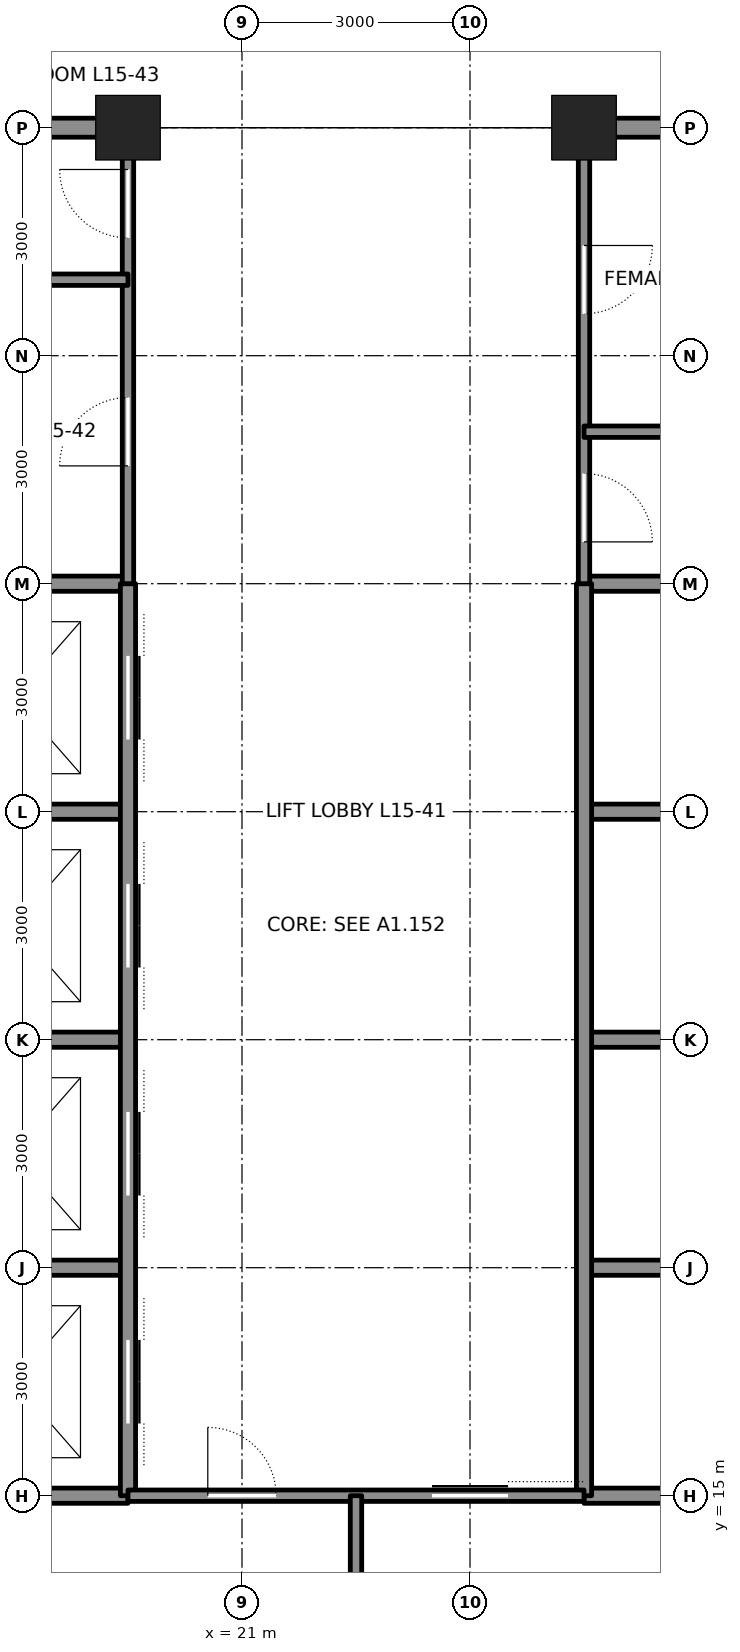
"""IFC4 building model, lengths in metres.
Left out: names, types, materials, properties, quantities, classifications, styles, units other than length and angle.
Written with IfcOpenShell. Run it as: python <this file> out.ifc"""

import sys

from ifc_helpers import new_model, si_unit, direction, frame, frame_2d, origin, origin_2d, place, context, subcontext, project, spatial, rectangle, hollow_rectangle, extrude, element, fill, save


model = new_model("IFC4")
c1 = context("Model", 3, precision=1e-05, world=origin(), true_north=direction((0.0, 1.0)))
c2 = subcontext(c1, "Body", "Model", "MODEL_VIEW")
j1 = project(units=[si_unit("LENGTHUNIT", "METRE"), si_unit("PLANEANGLEUNIT", "RADIAN")], contexts=[c1])
p1 = place(None, origin())
s1 = spatial("IfcSite", under=j1, at=p1, CompositionType="ELEMENT")
p2 = place(p1, origin())
s2 = spatial("IfcBuilding", under=s1, at=p2, CompositionType="ELEMENT")
p3 = place(p2, frame((0.0, 0.0, 73.8)))
s3 = spatial("IfcBuildingStorey", under=s2, at=p3, CompositionType="ELEMENT", Elevation=73.8)
for number, where, z_axis, x_axis in (
    (1, (19.5, 33.0, 0.0), (0.0, 0.0, 1.0), (1.0, 0.0, 0.0)),
    (2, (25.5, 33.0, 0.0), (0.0, 0.0, 1.0), (1.0, 0.0, 0.0)),
):
    element("IfcColumn", number, at=place(p3, frame(where, z_axis=z_axis, x_axis=x_axis)), inside=s3, PredefinedType="COLUMN", context=c2, shape_type="SweptSolid", body=[
        extrude(hollow_rectangle(XDim=0.85, YDim=0.85, WallThickness=0.085, at=origin_2d()), origin(), (0.0, 0.0, 1.0), 4.5),
    ])
for number, where, z_axis, x_axis in (
    (3, (12.0, 15.0, 0.0), (0.0, 0.0, 1.0), (1.0, 0.0, 0.0)),
    (4, (25.5, 15.0, 0.0), (0.0, 0.0, 1.0), (1.0, 0.0, 0.0)),
):
    element("IfcWall", number, at=place(p3, frame(where, z_axis=z_axis, x_axis=x_axis)), inside=s3, PredefinedType="SOLIDWALL", context=c2, shape_type="SweptSolid", body=[
        extrude(rectangle(XDim=7.5, YDim=0.2, at=frame_2d((3.75, 0.0))), origin(), (0.0, 0.0, 1.0), 4.34),
    ])
for number, where, z_axis, x_axis in (
    (5, (16.75, 24.0, 0.0), (0.0, 0.0, 1.0), (1.0, 0.0, 0.0)),
    (6, (25.5, 24.0, 0.0), (0.0, 0.0, 1.0), (1.0, 0.0, 0.0)),
):
    element("IfcWall", number, at=place(p3, frame(where, z_axis=z_axis, x_axis=x_axis)), inside=s3, PredefinedType="SOLIDWALL", context=c2, shape_type="SweptSolid", body=[
        extrude(rectangle(XDim=2.75, YDim=0.2, at=frame_2d((1.375, 0.0))), origin(), (0.0, 0.0, 1.0), 3.39),
    ])
p4 = place(p3, frame((12.0, 27.0, 0.0), z_axis=(0.0, 0.0, 1.0), x_axis=(1.0, 0.0, 0.0)))
e7 = element("IfcWall", 7, at=p4, inside=s3, PredefinedType="SOLIDWALL", context=c2, shape_type="SweptSolid", body=[
    extrude(rectangle(XDim=7.5, YDim=0.2, at=frame_2d((3.75, 0.0))), origin(), (0.0, 0.0, 1.0), 4.34),
])
p5 = place(p4, frame((1.65, 0.0, 0.0)))
e8 = element("IfcOpeningElement", 8, at=p5, cuts=e7, PredefinedType="OPENING", context=c2, shape_type="SweptSolid", body=[
    extrude(rectangle(XDim=1.2, YDim=2.1, at=frame_2d((0.6, 1.05))), frame((0.0, 0.11, 0.0), z_axis=(0.0, -1.0, 0.0), x_axis=(1.0, 0.0, 0.0)), (0.0, 0.0, 1.0), 0.22),
])
p6 = place(p3, frame((25.5, 27.0, 0.0), z_axis=(0.0, 0.0, 1.0), x_axis=(1.0, 0.0, 0.0)))
e9 = element("IfcWall", 9, at=p6, inside=s3, PredefinedType="SOLIDWALL", context=c2, shape_type="SweptSolid", body=[
    extrude(rectangle(XDim=3.0, YDim=0.2, at=frame_2d((1.5, 0.0))), origin(), (0.0, 0.0, 1.0), 4.34),
])
for number, where, z_axis, x_axis in (
    (10, (16.75, 33.0, 0.0), (0.0, 0.0, 1.0), (1.0, 0.0, 0.0)),
    (11, (25.75, 33.0, 0.0), (0.0, 0.0, 1.0), (1.0, 0.0, 0.0)),
):
    element("IfcWall", number, at=place(p3, frame(where, z_axis=z_axis, x_axis=x_axis)), inside=s3, PredefinedType="SOLIDWALL", context=c2, shape_type="SweptSolid", body=[
        extrude(rectangle(XDim=2.5, YDim=0.25, at=frame_2d((1.25, 0.0))), origin(), (0.0, 0.0, 1.0), 3.181),
    ])
p7 = place(p3, frame((16.5, 18.0, 0.0), z_axis=(0.0, 0.0, 1.0), x_axis=(1.0, 0.0, 0.0)))
e12 = element("IfcWall", 12, at=p7, inside=s3, PredefinedType="SOLIDWALL", context=c2, shape_type="SweptSolid", body=[
    extrude(rectangle(XDim=3.0, YDim=0.2, at=frame_2d((1.5, 0.0))), origin(), (0.0, 0.0, 1.0), 4.34),
])
p8 = place(p3, frame((25.5, 18.0, 0.0), z_axis=(0.0, 0.0, 1.0), x_axis=(1.0, 0.0, 0.0)))
e13 = element("IfcWall", 13, at=p8, inside=s3, PredefinedType="SOLIDWALL", context=c2, shape_type="SweptSolid", body=[
    extrude(rectangle(XDim=7.5, YDim=0.2, at=frame_2d((3.75, 0.0))), origin(), (0.0, 0.0, 1.0), 4.34),
])
p9 = place(p8, frame((4.65, 0.0, 0.0)))
e14 = element("IfcOpeningElement", 14, at=p9, cuts=e13, PredefinedType="OPENING", context=c2, shape_type="SweptSolid", body=[
    extrude(rectangle(XDim=1.2, YDim=2.1, at=frame_2d((0.6, 1.05))), frame((0.0, 0.11, 0.0), z_axis=(0.0, -1.0, 0.0), x_axis=(1.0, 0.0, 0.0)), (0.0, 0.0, 1.0), 0.22),
])
for number, where, z_axis, x_axis in (
    (15, (16.75, 21.0, 0.0), (0.0, 0.0, 1.0), (1.0, 0.0, 0.0)),
    (16, (25.5, 21.0, 0.0), (0.0, 0.0, 1.0), (1.0, 0.0, 0.0)),
):
    element("IfcWall", number, at=place(p3, frame(where, z_axis=z_axis, x_axis=x_axis)), inside=s3, PredefinedType="SOLIDWALL", context=c2, shape_type="SweptSolid", body=[
        extrude(rectangle(XDim=2.75, YDim=0.2, at=frame_2d((1.375, 0.0))), origin(), (0.0, 0.0, 1.0), 3.39),
    ])
p10 = place(p3, frame((19.5, 15.0, 0.0), z_axis=(0.0, 0.0, 1.0), x_axis=(0.0, 1.0, 0.0)))
e17 = element("IfcWall", 17, at=p10, inside=s3, PredefinedType="SOLIDWALL", context=c2, shape_type="SweptSolid", body=[
    extrude(rectangle(XDim=12.0, YDim=0.2, at=frame_2d((6.0, 0.0))), origin(), (0.0, 0.0, 1.0), 3.365),
])
p11 = place(p10, frame((0.95, 0.0, 0.0)))
e18 = element("IfcOpeningElement", 18, at=p11, cuts=e17, PredefinedType="OPENING", context=c2, shape_type="SweptSolid", body=[
    extrude(rectangle(XDim=1.1, YDim=2.1, at=frame_2d((0.55, 1.05))), frame((0.0, 0.11, 0.0), z_axis=(0.0, -1.0, 0.0), x_axis=(1.0, 0.0, 0.0)), (0.0, 0.0, 1.0), 0.22),
])
p12 = place(p10, frame((3.95, 0.0, 0.0)))
e19 = element("IfcOpeningElement", 19, at=p12, cuts=e17, PredefinedType="OPENING", context=c2, shape_type="SweptSolid", body=[
    extrude(rectangle(XDim=1.1, YDim=2.1, at=frame_2d((0.55, 1.05))), frame((0.0, 0.11, 0.0), z_axis=(0.0, -1.0, 0.0), x_axis=(1.0, 0.0, 0.0)), (0.0, 0.0, 1.0), 0.22),
])
p13 = place(p10, frame((6.95, 0.0, 0.0)))
e20 = element("IfcOpeningElement", 20, at=p13, cuts=e17, PredefinedType="OPENING", context=c2, shape_type="SweptSolid", body=[
    extrude(rectangle(XDim=1.1, YDim=2.1, at=frame_2d((0.55, 1.05))), frame((0.0, 0.11, 0.0), z_axis=(0.0, -1.0, 0.0), x_axis=(1.0, 0.0, 0.0)), (0.0, 0.0, 1.0), 0.22),
])
p14 = place(p10, frame((9.95, 0.0, 0.0)))
e21 = element("IfcOpeningElement", 21, at=p14, cuts=e17, PredefinedType="OPENING", context=c2, shape_type="SweptSolid", body=[
    extrude(rectangle(XDim=1.1, YDim=2.1, at=frame_2d((0.55, 1.05))), frame((0.0, 0.11, 0.0), z_axis=(0.0, -1.0, 0.0), x_axis=(1.0, 0.0, 0.0)), (0.0, 0.0, 1.0), 0.22),
])
p15 = place(p3, frame((19.5, 27.0, 0.0), z_axis=(0.0, 0.0, 1.0), x_axis=(0.0, 1.0, 0.0)))
e22 = element("IfcWall", 22, at=p15, inside=s3, PredefinedType="PARTITIONING", context=c2, shape_type="SweptSolid", body=[
    extrude(rectangle(XDim=5.75, YDim=0.15, at=frame_2d((2.875, 0.0))), origin(), (0.0, 0.0, 1.0), 3.365),
])
p16 = place(p15, frame((1.55, 0.0, 0.0)))
e23 = element("IfcOpeningElement", 23, at=p16, cuts=e22, PredefinedType="OPENING", context=c2, shape_type="SweptSolid", body=[
    extrude(rectangle(XDim=0.9, YDim=2.1, at=frame_2d((0.45, 1.05))), frame((0.0, 0.085, 0.0), z_axis=(0.0, -1.0, 0.0), x_axis=(1.0, 0.0, 0.0)), (0.0, 0.0, 1.0), 0.17),
])
p17 = place(p15, frame((4.55, 0.0, 0.0)))
e24 = element("IfcOpeningElement", 24, at=p17, cuts=e22, PredefinedType="OPENING", context=c2, shape_type="SweptSolid", body=[
    extrude(rectangle(XDim=0.9, YDim=2.1, at=frame_2d((0.45, 1.05))), frame((0.0, 0.085, 0.0), z_axis=(0.0, -1.0, 0.0), x_axis=(1.0, 0.0, 0.0)), (0.0, 0.0, 1.0), 0.17),
])
p18 = place(p3, frame((25.5, 15.0, 0.0), z_axis=(0.0, 0.0, 1.0), x_axis=(0.0, 1.0, 0.0)))
e25 = element("IfcWall", 25, at=p18, inside=s3, PredefinedType="SOLIDWALL", context=c2, shape_type="SweptSolid", body=[
    extrude(rectangle(XDim=12.0, YDim=0.2, at=frame_2d((6.0, 0.0))), origin(), (0.0, 0.0, 1.0), 3.365),
])
p19 = place(p3, frame((25.5, 27.0, 0.0), z_axis=(0.0, 0.0, 1.0), x_axis=(0.0, 1.0, 0.0)))
e26 = element("IfcWall", 26, at=p19, inside=s3, PredefinedType="PARTITIONING", context=c2, shape_type="SweptSolid", body=[
    extrude(rectangle(XDim=5.75, YDim=0.15, at=frame_2d((2.875, 0.0))), origin(), (0.0, 0.0, 1.0), 3.365),
])
p20 = place(p19, frame((0.55, 0.0, 0.0)))
e27 = element("IfcOpeningElement", 27, at=p20, cuts=e26, PredefinedType="OPENING", context=c2, shape_type="SweptSolid", body=[
    extrude(rectangle(XDim=0.9, YDim=2.1, at=frame_2d((0.45, 1.05))), frame((0.0, 0.085, 0.0), z_axis=(0.0, -1.0, 0.0), x_axis=(1.0, 0.0, 0.0)), (0.0, 0.0, 1.0), 0.17),
])
p21 = place(p19, frame((3.55, 0.0, 0.0)))
e28 = element("IfcOpeningElement", 28, at=p21, cuts=e26, PredefinedType="OPENING", context=c2, shape_type="SweptSolid", body=[
    extrude(rectangle(XDim=0.9, YDim=2.1, at=frame_2d((0.45, 1.05))), frame((0.0, 0.085, 0.0), z_axis=(0.0, -1.0, 0.0), x_axis=(1.0, 0.0, 0.0)), (0.0, 0.0, 1.0), 0.17),
])
p22 = place(p3, frame((19.5, 15.0, 0.0), z_axis=(0.0, 0.0, 1.0), x_axis=(1.0, 0.0, 0.0)))
e29 = element("IfcWall", 29, at=p22, inside=s3, PredefinedType="PARTITIONING", context=c2, shape_type="SweptSolid", body=[
    extrude(rectangle(XDim=6.0, YDim=0.15, at=frame_2d((3.0, 0.0))), origin(), (0.0, 0.0, 1.0), 4.34),
])
p23 = place(p22, frame((4.0, 0.0, 0.0)))
e30 = element("IfcOpeningElement", 30, at=p23, cuts=e29, PredefinedType="OPENING", context=c2, shape_type="SweptSolid", body=[
    extrude(rectangle(XDim=1.0, YDim=2.1, at=frame_2d((0.5, 1.05))), frame((0.0, 0.085, 0.0), z_axis=(0.0, -1.0, 0.0), x_axis=(1.0, 0.0, 0.0)), (0.0, 0.0, 1.0), 0.17),
])
p24 = place(p22, frame((1.05, 0.0, 0.0)))
e31 = element("IfcOpeningElement", 31, at=p24, cuts=e29, PredefinedType="OPENING", context=c2, shape_type="SweptSolid", body=[
    extrude(rectangle(XDim=0.9, YDim=2.1, at=frame_2d((0.45, 1.05))), frame((0.0, 0.085, 0.0), z_axis=(0.0, -1.0, 0.0), x_axis=(1.0, 0.0, 0.0)), (0.0, 0.0, 1.0), 0.17),
])
for number, where, z_axis, x_axis in (
    (32, (22.5, 15.0, 0.0), (0.0, 0.0, 1.0), (0.0, -1.0, 0.0)),
    (33, (16.5, 31.0, 0.0), (0.0, 0.0, 1.0), (1.0, 0.0, 0.0)),
    (34, (25.5, 29.0, 0.0), (0.0, 0.0, 1.0), (1.0, 0.0, 0.0)),
):
    element("IfcWall", number, at=place(p3, frame(where, z_axis=z_axis, x_axis=x_axis)), inside=s3, PredefinedType="PARTITIONING", context=c2, shape_type="SweptSolid", body=[
        extrude(rectangle(XDim=3.0, YDim=0.15, at=frame_2d((1.5, 0.0))), origin(), (0.0, 0.0, 1.0), 4.34),
    ])
p25 = place(p16, origin())
e35 = element("IfcDoor", 35, at=p25, inside=s3, OperationType="SINGLE_SWING_LEFT", PredefinedType="DOOR", context=c2, shape_type="SweptSolid", body=[
    extrude(rectangle(XDim=0.9, YDim=2.1, at=frame_2d((0.45, 1.05))), frame((0.0, 0.025, 0.0), z_axis=(0.0, -1.0, 0.0), x_axis=(1.0, 0.0, 0.0)), (0.0, 0.0, 1.0), 0.05),
])
fill(e23, e35)
p26 = place(p17, origin())
e36 = element("IfcDoor", 36, at=p26, inside=s3, OperationType="SINGLE_SWING_RIGHT", PredefinedType="DOOR", context=c2, shape_type="SweptSolid", body=[
    extrude(rectangle(XDim=0.9, YDim=2.1, at=frame_2d((0.45, 1.05))), frame((0.0, 0.025, 0.0), z_axis=(0.0, -1.0, 0.0), x_axis=(1.0, 0.0, 0.0)), (0.0, 0.0, 1.0), 0.05),
])
fill(e24, e36)
p27 = place(p20, frame((0.9, 0.0, 0.0), z_axis=(0.0, 0.0, 1.0), x_axis=(-1.0, 0.0, 0.0)))
e37 = element("IfcDoor", 37, at=p27, inside=s3, OperationType="SINGLE_SWING_RIGHT", PredefinedType="DOOR", context=c2, shape_type="SweptSolid", body=[
    extrude(rectangle(XDim=0.9, YDim=2.1, at=frame_2d((0.45, 1.05))), frame((0.0, 0.025, 0.0), z_axis=(0.0, -1.0, 0.0), x_axis=(1.0, 0.0, 0.0)), (0.0, 0.0, 1.0), 0.05),
])
fill(e27, e37)
p28 = place(p21, frame((0.9, 0.0, 0.0), z_axis=(0.0, 0.0, 1.0), x_axis=(-1.0, 0.0, 0.0)))
e38 = element("IfcDoor", 38, at=p28, inside=s3, OperationType="SINGLE_SWING_LEFT", PredefinedType="DOOR", context=c2, shape_type="SweptSolid", body=[
    extrude(rectangle(XDim=0.9, YDim=2.1, at=frame_2d((0.45, 1.05))), frame((0.0, 0.025, 0.0), z_axis=(0.0, -1.0, 0.0), x_axis=(1.0, 0.0, 0.0)), (0.0, 0.0, 1.0), 0.05),
])
fill(e28, e38)
p29 = place(p23, origin())
e39 = element("IfcDoor", 39, at=p29, inside=s3, OperationType="SLIDING_TO_LEFT", PredefinedType="DOOR", context=c2, shape_type="SweptSolid", body=[
    extrude(rectangle(XDim=1.0, YDim=2.1, at=frame_2d((0.5, 1.05))), frame((0.0, 0.025, 0.0), z_axis=(0.0, -1.0, 0.0), x_axis=(1.0, 0.0, 0.0)), (0.0, 0.0, 1.0), 0.05),
])
fill(e30, e39)
p30 = place(p24, origin())
e40 = element("IfcDoor", 40, at=p30, inside=s3, OperationType="SINGLE_SWING_LEFT", PredefinedType="DOOR", context=c2, shape_type="SweptSolid", body=[
    extrude(rectangle(XDim=0.9, YDim=2.1, at=frame_2d((0.45, 1.05))), frame((0.0, 0.025, 0.0), z_axis=(0.0, -1.0, 0.0), x_axis=(1.0, 0.0, 0.0)), (0.0, 0.0, 1.0), 0.05),
])
fill(e31, e40)
p31 = place(p11, origin())
e41 = element("IfcDoor", 41, at=p31, inside=s3, OperationType="DOUBLE_DOOR_SLIDING", PredefinedType="DOOR", context=c2, shape_type="SweptSolid", body=[
    extrude(rectangle(XDim=1.1, YDim=2.1, at=frame_2d((0.55, 1.05))), frame((0.0, 0.025, 0.0), z_axis=(0.0, -1.0, 0.0), x_axis=(1.0, 0.0, 0.0)), (0.0, 0.0, 1.0), 0.05),
])
fill(e18, e41)
p32 = place(p12, origin())
e42 = element("IfcDoor", 42, at=p32, inside=s3, OperationType="DOUBLE_DOOR_SLIDING", PredefinedType="DOOR", context=c2, shape_type="SweptSolid", body=[
    extrude(rectangle(XDim=1.1, YDim=2.1, at=frame_2d((0.55, 1.05))), frame((0.0, 0.025, 0.0), z_axis=(0.0, -1.0, 0.0), x_axis=(1.0, 0.0, 0.0)), (0.0, 0.0, 1.0), 0.05),
])
fill(e19, e42)
p33 = place(p13, origin())
e43 = element("IfcDoor", 43, at=p33, inside=s3, OperationType="DOUBLE_DOOR_SLIDING", PredefinedType="DOOR", context=c2, shape_type="SweptSolid", body=[
    extrude(rectangle(XDim=1.1, YDim=2.1, at=frame_2d((0.55, 1.05))), frame((0.0, 0.025, 0.0), z_axis=(0.0, -1.0, 0.0), x_axis=(1.0, 0.0, 0.0)), (0.0, 0.0, 1.0), 0.05),
])
fill(e20, e43)
p34 = place(p14, origin())
e44 = element("IfcDoor", 44, at=p34, inside=s3, OperationType="DOUBLE_DOOR_SLIDING", PredefinedType="DOOR", context=c2, shape_type="SweptSolid", body=[
    extrude(rectangle(XDim=1.1, YDim=2.1, at=frame_2d((0.55, 1.05))), frame((0.0, 0.025, 0.0), z_axis=(0.0, -1.0, 0.0), x_axis=(1.0, 0.0, 0.0)), (0.0, 0.0, 1.0), 0.05),
])
fill(e21, e44)
save(model, sys.argv[1])
